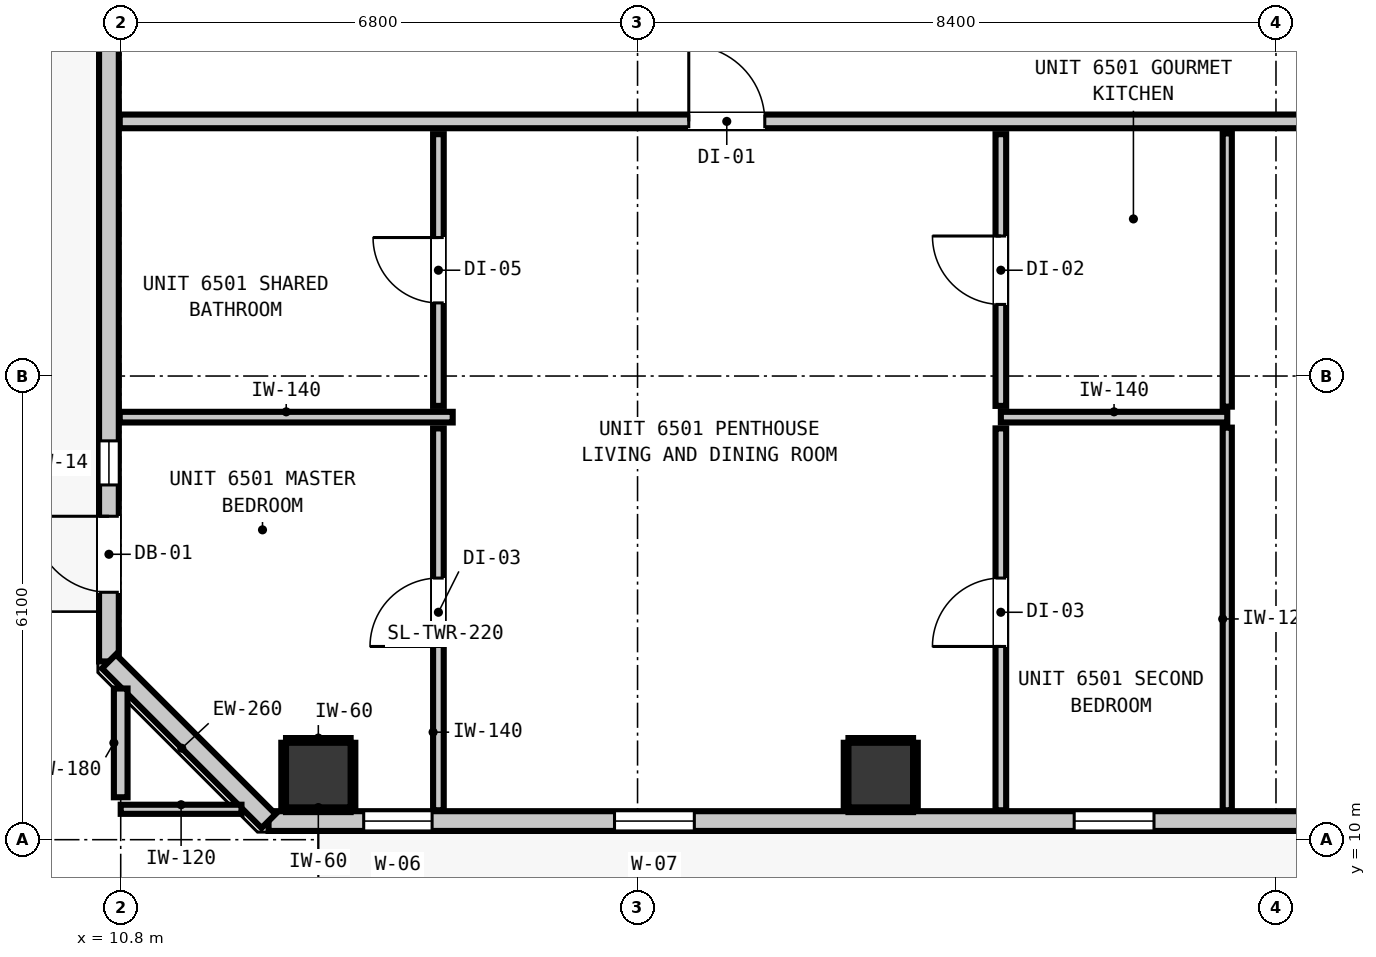
"""IFC4 building model, lengths in metres.
Left out: names, types, materials, properties, quantities, classifications, styles, units other than length and angle.
Written with IfcOpenShell. Run it as: python <this file> out.ifc"""

import sys

from ifc_helpers import new_model, si_unit, direction, frame, frame_2d, origin, origin_2d, place, context, subcontext, project, spatial, rectangle, extrude, element, fill, save


model = new_model("IFC4")
c1 = context("Model", 3, precision=1e-05, world=origin(), true_north=direction((0.0, 1.0)))
c2 = subcontext(c1, "Body", "Model", "MODEL_VIEW")
j1 = project(units=[si_unit("LENGTHUNIT", "METRE"), si_unit("PLANEANGLEUNIT", "RADIAN")], contexts=[c1])
p1 = place(None, origin())
s1 = spatial("IfcSite", under=j1, at=p1, CompositionType="ELEMENT")
p2 = place(p1, origin())
s2 = spatial("IfcBuilding", under=s1, at=p2, CompositionType="ELEMENT")
p3 = place(p2, frame((0.0, 0.0, 223.36)))
s3 = spatial("IfcBuildingStorey", under=s2, at=p3, CompositionType="ELEMENT", Elevation=223.36)
for number, where, z_axis, x_axis in (
    (1, (13.4, 10.85, 0.0), (0.0, 0.0, 1.0), (1.0, 0.0, 0.0)),
    (2, (20.8, 10.85, 0.0), (0.0, 0.0, 1.0), (1.0, 0.0, 0.0)),
):
    element("IfcColumn", number, at=place(p3, frame(where, z_axis=z_axis, x_axis=x_axis)), inside=s3, PredefinedType="COLUMN", context=c2, shape_type="SweptSolid", body=[
        extrude(rectangle(XDim=0.85, YDim=0.85, at=origin_2d()), origin(), (0.0, 0.0, 1.0), 3.32),
    ])
p4 = place(p3, frame((10.645, 12.345, 0.0), z_axis=(0.0, 0.0, 1.0), x_axis=(0.0, 1.0, 0.0)))
e3 = element("IfcWall", 3, at=p4, inside=s3, PredefinedType="STANDARD", context=c2, shape_type="SweptSolid", body=[
    extrude(rectangle(XDim=30.31, YDim=0.26, at=frame_2d((15.155, 0.0))), origin(), (0.0, 0.0, 1.0), 2.92),
])
p5 = place(p4, frame((0.91, 0.0, 0.0)))
e4 = element("IfcOpeningElement", 4, at=p5, cuts=e3, PredefinedType="OPENING", context=c2, shape_type="SweptSolid", body=[
    extrude(rectangle(XDim=1.0, YDim=2.15, at=frame_2d((0.5, 1.075))), frame((0.0, 0.14, 0.0), z_axis=(0.0, -1.0, 0.0), x_axis=(1.0, 0.0, 0.0)), (0.0, 0.0, 1.0), 0.28),
])
p6 = place(p4, frame((2.322, 0.0, 0.85)))
e5 = element("IfcOpeningElement", 5, at=p6, cuts=e3, PredefinedType="OPENING", context=c2, shape_type="SweptSolid", body=[
    extrude(rectangle(XDim=0.58, YDim=1.5, at=frame_2d((0.29, 0.75))), frame((0.0, 0.14, 0.0), z_axis=(0.0, -1.0, 0.0), x_axis=(1.0, 0.0, 0.0)), (0.0, 0.0, 1.0), 0.28),
])
p7 = place(p3, frame((45.455, 10.245, 0.0), z_axis=(0.0, 0.0, 1.0), x_axis=(-1.0, 0.0, 0.0)))
e6 = element("IfcWall", 6, at=p7, inside=s3, PredefinedType="STANDARD", context=c2, shape_type="SweptSolid", body=[
    extrude(rectangle(XDim=32.71, YDim=0.26, at=frame_2d((16.355, 0.0))), origin(), (0.0, 0.0, 1.0), 2.92),
])
p8 = place(p7, frame((0.907, 0.0, 0.0)))
e7 = element("IfcOpeningElement", 7, at=p8, cuts=e6, PredefinedType="OPENING", context=c2, shape_type="SweptSolid", body=[
    extrude(rectangle(XDim=1.0, YDim=2.15, at=frame_2d((0.5, 1.075))), frame((0.0, 0.14, 0.0), z_axis=(0.0, -1.0, 0.0), x_axis=(1.0, 0.0, 0.0)), (0.0, 0.0, 1.0), 0.28),
])
p9 = place(p7, frame((27.108, 0.0, 0.85)))
e8 = element("IfcOpeningElement", 8, at=p9, cuts=e6, PredefinedType="OPENING", context=c2, shape_type="SweptSolid", body=[
    extrude(rectangle(XDim=1.05, YDim=1.65, at=frame_2d((0.525, 0.825))), frame((0.0, 0.14, 0.0), z_axis=(0.0, -1.0, 0.0), x_axis=(1.0, 0.0, 0.0)), (0.0, 0.0, 1.0), 0.28),
])
p10 = place(p7, frame((30.558, 0.0, 0.85)))
e9 = element("IfcOpeningElement", 9, at=p10, cuts=e6, PredefinedType="OPENING", context=c2, shape_type="SweptSolid", body=[
    extrude(rectangle(XDim=0.9, YDim=1.5, at=frame_2d((0.45, 0.75))), frame((0.0, 0.14, 0.0), z_axis=(0.0, -1.0, 0.0), x_axis=(1.0, 0.0, 0.0)), (0.0, 0.0, 1.0), 0.28),
])
p11 = place(p7, frame((21.06, 0.0, 0.85)))
e10 = element("IfcOpeningElement", 10, at=p11, cuts=e6, PredefinedType="OPENING", context=c2, shape_type="SweptSolid", body=[
    extrude(rectangle(XDim=1.05, YDim=1.65, at=frame_2d((0.525, 0.825))), frame((0.0, 0.14, 0.0), z_axis=(0.0, -1.0, 0.0), x_axis=(1.0, 0.0, 0.0)), (0.0, 0.0, 1.0), 0.28),
])
p12 = place(p7, frame((12.08, 0.0, 0.85)))
e11 = element("IfcOpeningElement", 11, at=p12, cuts=e6, PredefinedType="OPENING", context=c2, shape_type="SweptSolid", body=[
    extrude(rectangle(XDim=1.05, YDim=1.65, at=frame_2d((0.525, 0.825))), frame((0.0, 0.14, 0.0), z_axis=(0.0, -1.0, 0.0), x_axis=(1.0, 0.0, 0.0)), (0.0, 0.0, 1.0), 0.28),
])
p13 = place(p3, frame((12.745, 10.245, 0.0), z_axis=(0.0, 0.0, 1.0), x_axis=(-0.707147883682, 0.707065676302, 0.0)))
e12 = element("IfcWall", 12, at=p13, inside=s3, PredefinedType="STANDARD", context=c2, shape_type="SweptSolid", body=[
    extrude(rectangle(XDim=2.97, YDim=0.26, at=frame_2d((1.485, 0.0))), origin(), (0.0, 0.0, 1.0), 2.92),
])
p14 = place(p3, frame((10.787, 19.45, 0.0), z_axis=(0.0, 0.0, 1.0), x_axis=(1.0, 0.0, 0.0)))
e13 = element("IfcWall", 13, at=p14, inside=s3, PredefinedType="PARTITIONING", context=c2, shape_type="SweptSolid", body=[
    extrude(rectangle(XDim=36.626, YDim=0.18, at=frame_2d((18.313, 0.0))), origin(), (0.0, 0.0, 1.0), 2.92),
])
p15 = place(p14, frame((7.487, 0.0, 0.0)))
e14 = element("IfcOpeningElement", 14, at=p15, cuts=e13, PredefinedType="OPENING", context=c2, shape_type="SweptSolid", body=[
    extrude(rectangle(XDim=1.0, YDim=2.15, at=frame_2d((0.5, 1.075))), frame((0.0, 0.1, 0.0), z_axis=(0.0, -1.0, 0.0), x_axis=(1.0, 0.0, 0.0)), (0.0, 0.0, 1.0), 0.2),
])
p16 = place(p14, frame((25.118, 0.0, 0.0)))
e15 = element("IfcOpeningElement", 15, at=p16, cuts=e13, PredefinedType="OPENING", context=c2, shape_type="SweptSolid", body=[
    extrude(rectangle(XDim=0.9, YDim=2.1, at=frame_2d((0.45, 1.05))), frame((0.0, 0.1, 0.0), z_axis=(0.0, -1.0, 0.0), x_axis=(1.0, 0.0, 0.0)), (0.0, 0.0, 1.0), 0.2),
])
p17 = place(p3, frame((10.787, 15.559, 0.0), z_axis=(0.0, 0.0, 1.0), x_axis=(1.0, 0.0, 0.0)))
e16 = element("IfcWall", 16, at=p17, inside=s3, PredefinedType="PARTITIONING", context=c2, shape_type="SweptSolid", body=[
    extrude(rectangle(XDim=4.381, YDim=0.14, at=frame_2d((2.19, 0.0))), origin(), (0.0, 0.0, 1.0), 2.92),
])
p18 = place(p3, frame((22.38, 15.559, 0.0), z_axis=(0.0, 0.0, 1.0), x_axis=(1.0, 0.0, 0.0)))
e17 = element("IfcWall", 17, at=p18, inside=s3, PredefinedType="PARTITIONING", context=c2, shape_type="SweptSolid", body=[
    extrude(rectangle(XDim=2.979, YDim=0.14, at=frame_2d((1.49, 0.0))), origin(), (0.0, 0.0, 1.0), 2.92),
])
p19 = place(p3, frame((10.8, 10.4, 0.0), z_axis=(0.0, 0.0, 1.0), x_axis=(1.0, 0.0, 0.0)))
e18 = element("IfcWall", 18, at=p19, inside=s3, PredefinedType="PARTITIONING", context=c2, shape_type="SweptSolid", body=[
    extrude(rectangle(XDim=1.589, YDim=0.12, at=frame_2d((0.794, 0.0))), origin(), (0.0, 0.0, 1.0), 2.92),
])
p20 = place(p3, frame((10.8, 10.558, 0.0), z_axis=(0.0, 0.0, 1.0), x_axis=(0.0, 1.0, 0.0)))
e19 = element("IfcWall", 19, at=p20, inside=s3, PredefinedType="PARTITIONING", context=c2, shape_type="SweptSolid", body=[
    extrude(rectangle(XDim=1.431, YDim=0.18, at=frame_2d((0.715, 0.0))), origin(), (0.0, 0.0, 1.0), 2.92),
])
p21 = place(p3, frame((14.98, 10.387, 0.0), z_axis=(0.0, 0.0, 1.0), x_axis=(0.0, 1.0, 0.0)))
e20 = element("IfcWall", 20, at=p21, inside=s3, PredefinedType="PARTITIONING", context=c2, shape_type="SweptSolid", body=[
    extrude(rectangle(XDim=5.024, YDim=0.14, at=frame_2d((2.512, 0.0))), origin(), (0.0, 0.0, 1.0), 2.92),
])
p22 = place(p21, frame((2.155, 0.0, 0.0)))
e21 = element("IfcOpeningElement", 21, at=p22, cuts=e20, PredefinedType="OPENING", context=c2, shape_type="SweptSolid", body=[
    extrude(rectangle(XDim=0.9, YDim=2.1, at=frame_2d((0.45, 1.05))), frame((0.0, 0.08, 0.0), z_axis=(0.0, -1.0, 0.0), x_axis=(1.0, 0.0, 0.0)), (0.0, 0.0, 1.0), 0.16),
])
p23 = place(p3, frame((14.98, 15.707, 0.0), z_axis=(0.0, 0.0, 1.0), x_axis=(0.0, 1.0, 0.0)))
e22 = element("IfcWall", 22, at=p23, inside=s3, PredefinedType="PARTITIONING", context=c2, shape_type="SweptSolid", body=[
    extrude(rectangle(XDim=3.575, YDim=0.14, at=frame_2d((1.788, 0.0))), origin(), (0.0, 0.0, 1.0), 2.92),
])
p24 = place(p23, frame((1.355, 0.0, 0.0)))
e23 = element("IfcOpeningElement", 23, at=p24, cuts=e22, PredefinedType="OPENING", context=c2, shape_type="SweptSolid", body=[
    extrude(rectangle(XDim=0.86, YDim=2.02, at=frame_2d((0.43, 1.01))), frame((0.0, 0.08, 0.0), z_axis=(0.0, -1.0, 0.0), x_axis=(1.0, 0.0, 0.0)), (0.0, 0.0, 1.0), 0.16),
])
p25 = place(p3, frame((22.38, 10.387, 0.0), z_axis=(0.0, 0.0, 1.0), x_axis=(0.0, 1.0, 0.0)))
e24 = element("IfcWall", 24, at=p25, inside=s3, PredefinedType="PARTITIONING", context=c2, shape_type="SweptSolid", body=[
    extrude(rectangle(XDim=5.024, YDim=0.14, at=frame_2d((2.512, 0.0))), origin(), (0.0, 0.0, 1.0), 2.92),
])
p26 = place(p25, frame((2.155, 0.0, 0.0)))
e25 = element("IfcOpeningElement", 25, at=p26, cuts=e24, PredefinedType="OPENING", context=c2, shape_type="SweptSolid", body=[
    extrude(rectangle(XDim=0.9, YDim=2.1, at=frame_2d((0.45, 1.05))), frame((0.0, 0.08, 0.0), z_axis=(0.0, -1.0, 0.0), x_axis=(1.0, 0.0, 0.0)), (0.0, 0.0, 1.0), 0.16),
])
p27 = place(p3, frame((22.38, 15.707, 0.0), z_axis=(0.0, 0.0, 1.0), x_axis=(0.0, 1.0, 0.0)))
e26 = element("IfcWall", 26, at=p27, inside=s3, PredefinedType="PARTITIONING", context=c2, shape_type="SweptSolid", body=[
    extrude(rectangle(XDim=3.575, YDim=0.14, at=frame_2d((1.788, 0.0))), origin(), (0.0, 0.0, 1.0), 2.92),
])
p28 = place(p27, frame((1.335, 0.0, 0.0)))
e27 = element("IfcOpeningElement", 27, at=p28, cuts=e26, PredefinedType="OPENING", context=c2, shape_type="SweptSolid", body=[
    extrude(rectangle(XDim=0.9, YDim=2.1, at=frame_2d((0.45, 1.05))), frame((0.0, 0.08, 0.0), z_axis=(0.0, -1.0, 0.0), x_axis=(1.0, 0.0, 0.0)), (0.0, 0.0, 1.0), 0.16),
])
p29 = place(p3, frame((25.359, 10.387, 0.0), z_axis=(0.0, 0.0, 1.0), x_axis=(0.0, 1.0, 0.0)))
e28 = element("IfcWall", 28, at=p29, inside=s3, PredefinedType="PARTITIONING", context=c2, shape_type="SweptSolid", body=[
    extrude(rectangle(XDim=5.034, YDim=0.12, at=frame_2d((2.517, 0.0))), origin(), (0.0, 0.0, 1.0), 2.92),
])
p30 = place(p3, frame((25.359, 15.697, 0.0), z_axis=(0.0, 0.0, 1.0), x_axis=(0.0, 1.0, 0.0)))
e29 = element("IfcWall", 29, at=p30, inside=s3, PredefinedType="PARTITIONING", context=c2, shape_type="SweptSolid", body=[
    extrude(rectangle(XDim=3.595, YDim=0.12, at=frame_2d((1.797, 0.0))), origin(), (0.0, 0.0, 1.0), 2.92),
])
for number, where, z_axis, x_axis in (
    (30, (12.975, 10.393, 0.0), (0.0, 0.0, 1.0), (1.0, 0.0, 0.0)),
    (31, (12.975, 11.307, 0.0), (0.0, 0.0, 1.0), (1.0, 0.0, 0.0)),
    (32, (12.943, 10.425, 0.0), (0.0, 0.0, 1.0), (0.0, 1.0, 0.0)),
    (33, (13.857, 10.425, 0.0), (0.0, 0.0, 1.0), (0.0, 1.0, 0.0)),
):
    element("IfcWall", number, at=place(p3, frame(where, z_axis=z_axis, x_axis=x_axis)), inside=s3, PredefinedType="PARTITIONING", context=c2, shape_type="SweptSolid", body=[
        extrude(rectangle(XDim=0.85, YDim=0.06, at=frame_2d((0.425, 0.0))), origin(), (0.0, 0.0, 1.0), 1.45),
    ])
for number, where, z_axis, x_axis in (
    (34, (20.375, 10.393, 0.0), (0.0, 0.0, 1.0), (1.0, 0.0, 0.0)),
    (35, (20.375, 11.307, 0.0), (0.0, 0.0, 1.0), (1.0, 0.0, 0.0)),
):
    element("IfcWall", number, at=place(p3, frame(where, z_axis=z_axis, x_axis=x_axis)), inside=s3, PredefinedType="PARTITIONING", context=c2, shape_type="SweptSolid", body=[
        extrude(rectangle(XDim=0.85, YDim=0.06, at=frame_2d((0.425, 0.0))), origin(), (0.0, 0.0, 1.0), 1.45),
    ])
for number, where, z_axis, x_axis in (
    (36, (20.343, 10.425, 0.0), (0.0, 0.0, 1.0), (0.0, 1.0, 0.0)),
    (37, (21.257, 10.425, 0.0), (0.0, 0.0, 1.0), (0.0, 1.0, 0.0)),
):
    element("IfcWall", number, at=place(p3, frame(where, z_axis=z_axis, x_axis=x_axis)), inside=s3, PredefinedType="PARTITIONING", context=c2, shape_type="SweptSolid", body=[
        extrude(rectangle(XDim=0.85, YDim=0.06, at=frame_2d((0.425, 0.0))), origin(), (0.0, 0.0, 1.0), 1.45),
    ])
p31 = place(p5, origin())
e38 = element("IfcDoor", 38, at=p31, inside=s3, OperationType="SINGLE_SWING_RIGHT", PredefinedType="DOOR", context=c2, shape_type="SweptSolid", body=[
    extrude(rectangle(XDim=1.0, YDim=2.15, at=frame_2d((0.5, 1.075))), frame((0.0, 0.025, 0.0), z_axis=(0.0, -1.0, 0.0), x_axis=(1.0, 0.0, 0.0)), (0.0, 0.0, 1.0), 0.05),
])
fill(e4, e38)
p32 = place(p6, origin())
e39 = element("IfcWindow", 39, at=p32, inside=s3, PartitioningType="SINGLE_PANEL", PredefinedType="WINDOW", context=c2, shape_type="SweptSolid", body=[
    extrude(rectangle(XDim=0.58, YDim=1.5, at=frame_2d((0.29, 0.75))), frame((0.0, 0.03, 0.0), z_axis=(0.0, -1.0, 0.0), x_axis=(1.0, 0.0, 0.0)), (0.0, 0.0, 1.0), 0.06),
])
fill(e5, e39)
p33 = place(p9, origin())
e40 = element("IfcWindow", 40, at=p33, inside=s3, PartitioningType="SINGLE_PANEL", PredefinedType="WINDOW", context=c2, shape_type="SweptSolid", body=[
    extrude(rectangle(XDim=1.05, YDim=1.65, at=frame_2d((0.525, 0.825))), frame((0.0, 0.03, 0.0), z_axis=(0.0, -1.0, 0.0), x_axis=(1.0, 0.0, 0.0)), (0.0, 0.0, 1.0), 0.06),
])
fill(e8, e40)
p34 = place(p10, origin())
e41 = element("IfcWindow", 41, at=p34, inside=s3, PartitioningType="SINGLE_PANEL", PredefinedType="WINDOW", context=c2, shape_type="SweptSolid", body=[
    extrude(rectangle(XDim=0.9, YDim=1.5, at=frame_2d((0.45, 0.75))), frame((0.0, 0.03, 0.0), z_axis=(0.0, -1.0, 0.0), x_axis=(1.0, 0.0, 0.0)), (0.0, 0.0, 1.0), 0.06),
])
fill(e9, e41)
p35 = place(p11, origin())
e42 = element("IfcWindow", 42, at=p35, inside=s3, PartitioningType="SINGLE_PANEL", PredefinedType="WINDOW", context=c2, shape_type="SweptSolid", body=[
    extrude(rectangle(XDim=1.05, YDim=1.65, at=frame_2d((0.525, 0.825))), frame((0.0, 0.03, 0.0), z_axis=(0.0, -1.0, 0.0), x_axis=(1.0, 0.0, 0.0)), (0.0, 0.0, 1.0), 0.06),
])
fill(e10, e42)
p36 = place(p15, origin())
e43 = element("IfcDoor", 43, at=p36, inside=s3, OperationType="SINGLE_SWING_LEFT", PredefinedType="DOOR", context=c2, shape_type="SweptSolid", body=[
    extrude(rectangle(XDim=1.0, YDim=2.15, at=frame_2d((0.5, 1.075))), frame((0.0, 0.025, 0.0), z_axis=(0.0, -1.0, 0.0), x_axis=(1.0, 0.0, 0.0)), (0.0, 0.0, 1.0), 0.05),
])
fill(e14, e43)
p37 = place(p24, origin())
e44 = element("IfcDoor", 44, at=p37, inside=s3, OperationType="SINGLE_SWING_RIGHT", PredefinedType="DOOR", context=c2, shape_type="SweptSolid", body=[
    extrude(rectangle(XDim=0.86, YDim=2.02, at=frame_2d((0.43, 1.01))), frame((0.0, 0.025, 0.0), z_axis=(0.0, -1.0, 0.0), x_axis=(1.0, 0.0, 0.0)), (0.0, 0.0, 1.0), 0.05),
])
fill(e23, e44)
p38 = place(p22, origin())
e45 = element("IfcDoor", 45, at=p38, inside=s3, OperationType="SINGLE_SWING_LEFT", PredefinedType="DOOR", context=c2, shape_type="SweptSolid", body=[
    extrude(rectangle(XDim=0.9, YDim=2.1, at=frame_2d((0.45, 1.05))), frame((0.0, 0.025, 0.0), z_axis=(0.0, -1.0, 0.0), x_axis=(1.0, 0.0, 0.0)), (0.0, 0.0, 1.0), 0.05),
])
fill(e21, e45)
p39 = place(p28, origin())
e46 = element("IfcDoor", 46, at=p39, inside=s3, OperationType="SINGLE_SWING_RIGHT", PredefinedType="DOOR", context=c2, shape_type="SweptSolid", body=[
    extrude(rectangle(XDim=0.9, YDim=2.1, at=frame_2d((0.45, 1.05))), frame((0.0, 0.025, 0.0), z_axis=(0.0, -1.0, 0.0), x_axis=(1.0, 0.0, 0.0)), (0.0, 0.0, 1.0), 0.05),
])
fill(e27, e46)
p40 = place(p26, origin())
e47 = element("IfcDoor", 47, at=p40, inside=s3, OperationType="SINGLE_SWING_LEFT", PredefinedType="DOOR", context=c2, shape_type="SweptSolid", body=[
    extrude(rectangle(XDim=0.9, YDim=2.1, at=frame_2d((0.45, 1.05))), frame((0.0, 0.025, 0.0), z_axis=(0.0, -1.0, 0.0), x_axis=(1.0, 0.0, 0.0)), (0.0, 0.0, 1.0), 0.05),
])
fill(e25, e47)
save(model, sys.argv[1])
